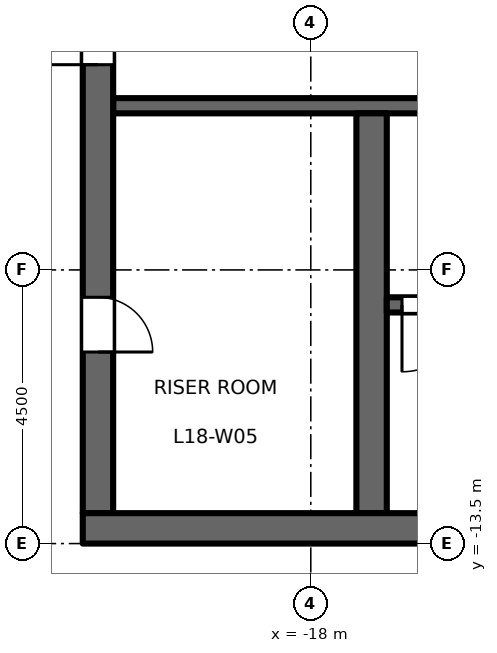
"""IFC4 building model, lengths in metres.
Left out: names, types, materials, properties, quantities, classifications, styles, units other than length and angle.
Written with IfcOpenShell. Run it as: python <this file> out.ifc"""

import sys

from ifc_helpers import new_model, si_unit, direction, frame, frame_2d, origin, place, context, subcontext, project, spatial, rectangle, extrude, element, fill, save


model = new_model("IFC4")
c1 = context("Model", 3, precision=1e-05, world=origin(), true_north=direction((0.0, 1.0)))
c2 = subcontext(c1, "Body", "Model", "MODEL_VIEW")
j1 = project(units=[si_unit("LENGTHUNIT", "METRE"), si_unit("PLANEANGLEUNIT", "RADIAN")], contexts=[c1])
p1 = place(None, origin())
s1 = spatial("IfcSite", under=j1, at=p1, CompositionType="ELEMENT")
p2 = place(p1, origin())
s2 = spatial("IfcBuilding", under=s1, at=p2, CompositionType="ELEMENT")
p3 = place(p2, frame((0.0, 0.0, 85.2)))
s3 = spatial("IfcBuildingStorey", under=s2, at=p3, CompositionType="ELEMENT", Elevation=85.2)
p4 = place(p3, frame((-12.15, -6.3, 0.0), z_axis=(0.0, 0.0, 1.0), x_axis=(-1.0, 0.0, 0.0)))
e1 = element("IfcWall", 1, at=p4, inside=s3, PredefinedType="SHEAR", context=c2, shape_type="SweptSolid", body=[
    extrude(rectangle(XDim=9.1, YDim=0.25, at=frame_2d((4.55, 0.0))), origin(), (0.0, 0.0, 1.0), 4.35),
])
p5 = place(p4, frame((1.8, 0.0, 0.0)))
e2 = element("IfcOpeningElement", 2, at=p5, cuts=e1, PredefinedType="OPENING", context=c2, shape_type="SweptSolid", body=[
    extrude(rectangle(XDim=1.0, YDim=2.1, at=frame_2d((0.5, 1.05))), frame((0.0, 0.135, 0.0), z_axis=(0.0, -1.0, 0.0), x_axis=(1.0, 0.0, 0.0)), (0.0, 0.0, 1.0), 0.27),
])
p6 = place(p3, frame((-21.5, -13.0, 0.0), z_axis=(0.0, 0.0, 1.0), x_axis=(0.0, 1.0, 0.0)))
e3 = element("IfcWall", 3, at=p6, inside=s3, PredefinedType="SHEAR", context=c2, shape_type="SweptSolid", body=[
    extrude(rectangle(XDim=26.0, YDim=0.5, at=frame_2d((13.0, 0.0))), origin(), (0.0, 0.0, 1.0), 4.35),
])
p7 = place(p6, frame((16.825, 0.0, 0.0)))
e4 = element("IfcOpeningElement", 4, at=p7, cuts=e3, PredefinedType="OPENING", context=c2, shape_type="SweptSolid", body=[
    extrude(rectangle(XDim=1.8, YDim=2.1, at=frame_2d((0.9, 1.05))), frame((0.0, 0.26, 0.0), z_axis=(0.0, -1.0, 0.0), x_axis=(1.0, 0.0, 0.0)), (0.0, 0.0, 1.0), 0.52),
])
p8 = place(p6, frame((7.375, 0.0, 0.0)))
e5 = element("IfcOpeningElement", 5, at=p8, cuts=e3, PredefinedType="OPENING", context=c2, shape_type="SweptSolid", body=[
    extrude(rectangle(XDim=1.8, YDim=2.1, at=frame_2d((0.9, 1.05))), frame((0.0, 0.26, 0.0), z_axis=(0.0, -1.0, 0.0), x_axis=(1.0, 0.0, 0.0)), (0.0, 0.0, 1.0), 0.52),
])
p9 = place(p6, frame((2.65, 0.0, 0.0)))
e6 = element("IfcOpeningElement", 6, at=p9, cuts=e3, PredefinedType="OPENING", context=c2, shape_type="SweptSolid", body=[
    extrude(rectangle(XDim=0.9, YDim=2.1, at=frame_2d((0.45, 1.05))), frame((0.0, 0.26, 0.0), z_axis=(0.0, -1.0, 0.0), x_axis=(1.0, 0.0, 0.0)), (0.0, 0.0, 1.0), 0.52),
])
p10 = place(p3, frame((-17.0, -13.0, 0.0), z_axis=(0.0, 0.0, 1.0), x_axis=(0.0, 1.0, 0.0)))
e7 = element("IfcWall", 7, at=p10, inside=s3, PredefinedType="SHEAR", context=c2, shape_type="SweptSolid", body=[
    extrude(rectangle(XDim=6.575, YDim=0.5, at=frame_2d((3.288, 0.0))), origin(), (0.0, 0.0, 1.0), 4.35),
])
p11 = place(p3, frame((-8.75, -9.575, 0.0), z_axis=(0.0, 0.0, 1.0), x_axis=(-1.0, 0.0, 0.0)))
e8 = element("IfcWall", 8, at=p11, inside=s3, PredefinedType="SHEAR", context=c2, shape_type="SweptSolid", body=[
    extrude(rectangle(XDim=8.0, YDim=0.25, at=frame_2d((4.0, 0.0))), origin(), (0.0, 0.0, 1.0), 4.35),
])
p12 = place(p11, frame((6.65, 0.0, 0.0)))
e9 = element("IfcOpeningElement", 9, at=p12, cuts=e8, PredefinedType="OPENING", context=c2, shape_type="SweptSolid", body=[
    extrude(rectangle(XDim=1.1, YDim=2.1, at=frame_2d((0.55, 1.05))), frame((0.0, 0.135, 0.0), z_axis=(0.0, -1.0, 0.0), x_axis=(1.0, 0.0, 0.0)), (0.0, 0.0, 1.0), 0.27),
])
p13 = place(p3, frame((-8.25, -13.25, 0.0), z_axis=(0.0, 0.0, 1.0), x_axis=(-1.0, 0.0, 0.0)))
e10 = element("IfcWall", 10, at=p13, inside=s3, PredefinedType="SHEAR", context=c2, shape_type="SweptSolid", body=[
    extrude(rectangle(XDim=13.5, YDim=0.5, at=frame_2d((6.75, 0.0))), origin(), (0.0, 0.0, 1.0), 4.35),
])
p14 = place(p12, origin())
e11 = element("IfcDoor", 11, at=p14, inside=s3, OperationType="SINGLE_SWING_LEFT", PredefinedType="DOOR", context=c2, shape_type="SweptSolid", body=[
    extrude(rectangle(XDim=1.1, YDim=2.1, at=frame_2d((0.55, 1.05))), frame((0.0, 0.025, 0.0), z_axis=(0.0, -1.0, 0.0), x_axis=(1.0, 0.0, 0.0)), (0.0, 0.0, 1.0), 0.05),
])
fill(e9, e11)
p15 = place(p8, origin())
e12 = element("IfcDoor", 12, at=p15, inside=s3, OperationType="DOUBLE_DOOR_DOUBLE_SWING", PredefinedType="DOOR", context=c2, shape_type="SweptSolid", body=[
    extrude(rectangle(XDim=1.8, YDim=2.1, at=frame_2d((0.9, 1.05))), frame((0.0, 0.025, 0.0), z_axis=(0.0, -1.0, 0.0), x_axis=(1.0, 0.0, 0.0)), (0.0, 0.0, 1.0), 0.05),
])
fill(e5, e12)
p16 = place(p9, origin())
e13 = element("IfcDoor", 13, at=p16, inside=s3, OperationType="SINGLE_SWING_LEFT", PredefinedType="DOOR", context=c2, shape_type="SweptSolid", body=[
    extrude(rectangle(XDim=0.9, YDim=2.1, at=frame_2d((0.45, 1.05))), frame((0.0, 0.025, 0.0), z_axis=(0.0, -1.0, 0.0), x_axis=(1.0, 0.0, 0.0)), (0.0, 0.0, 1.0), 0.05),
])
fill(e6, e13)
save(model, sys.argv[1])
